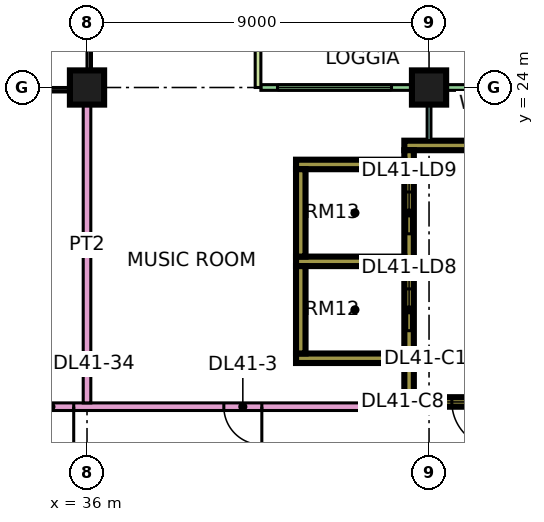
"""IFC4 building model, lengths in metres.
Left out: names, types, materials, properties, quantities, classifications, styles, units other than length and angle.
Written with IfcOpenShell. Run it as: python <this file> out.ifc"""

import sys

from ifc_helpers import new_model, si_unit, direction, frame, frame_2d, origin, origin_2d, place, context, subcontext, project, spatial, rectangle, extrude, element, fill, save


model = new_model("IFC4")
c1 = context("Model", 3, precision=1e-05, world=origin(), true_north=direction((0.0, 1.0)))
c2 = subcontext(c1, "Body", "Model", "MODEL_VIEW")
j1 = project(units=[si_unit("LENGTHUNIT", "METRE"), si_unit("PLANEANGLEUNIT", "RADIAN")], contexts=[c1])
p1 = place(None, origin())
s1 = spatial("IfcSite", under=j1, at=p1, CompositionType="ELEMENT")
p2 = place(p1, origin())
s2 = spatial("IfcBuilding", under=s1, at=p2, CompositionType="ELEMENT")
p3 = place(p2, frame((0.0, 0.0, 179.9)))
s3 = spatial("IfcBuildingStorey", under=s2, at=p3, CompositionType="ELEMENT", Elevation=179.9)
for number, where, z_axis, x_axis in (
    (1, (36.0, 24.0, 0.0), (0.0, 0.0, 1.0), (1.0, 0.0, 0.0)),
    (2, (45.0, 24.0, 0.0), (0.0, 0.0, 1.0), (1.0, 0.0, 0.0)),
):
    element("IfcColumn", number, at=place(p3, frame(where, z_axis=z_axis, x_axis=x_axis)), inside=s3, PredefinedType="COLUMN", context=c2, shape_type="SweptSolid", body=[
        extrude(rectangle(XDim=0.9, YDim=0.9, at=origin_2d()), origin(), (0.0, 0.0, 1.0), 3.75),
    ])
p4 = place(p3, frame((44.35, 15.725, 0.0), z_axis=(0.0, 0.0, 1.0), x_axis=(1.0, 0.0, 0.0)))
e3 = element("IfcWall", 3, at=p4, inside=s3, PredefinedType="SHEAR", context=c2, shape_type="SweptSolid", body=[
    extrude(rectangle(XDim=3.425, YDim=0.25, at=frame_2d((1.712, 0.0))), origin(), (0.0, 0.0, 1.0), 3.75),
])
p5 = place(p4, frame((1.25, 0.0, 0.0)))
e4 = element("IfcOpeningElement", 4, at=p5, cuts=e3, PredefinedType="OPENING", context=c2, shape_type="SweptSolid", body=[
    extrude(rectangle(XDim=1.2, YDim=2.2, at=frame_2d((0.6, 1.1))), frame((0.0, 0.135, 0.0), z_axis=(0.0, -1.0, 0.0), x_axis=(1.0, 0.0, 0.0)), (0.0, 0.0, 1.0), 0.27),
])
p6 = place(p3, frame((44.35, 22.475, 0.0), z_axis=(0.0, 0.0, 1.0), x_axis=(1.0, 0.0, 0.0)))
e5 = element("IfcWall", 5, at=p6, inside=s3, PredefinedType="SHEAR", context=c2, shape_type="SweptSolid", body=[
    extrude(rectangle(XDim=3.425, YDim=0.25, at=frame_2d((1.712, 0.0))), origin(), (0.0, 0.0, 1.0), 3.75),
])
p7 = place(p3, frame((44.475, 15.85, 0.0), z_axis=(0.0, 0.0, 1.0), x_axis=(0.0, 1.0, 0.0)))
e6 = element("IfcWall", 6, at=p7, inside=s3, PredefinedType="SHEAR", context=c2, shape_type="SweptSolid", body=[
    extrude(rectangle(XDim=6.5, YDim=0.25, at=frame_2d((3.25, 0.0))), origin(), (0.0, 0.0, 1.0), 3.75),
])
p8 = place(p7, frame((1.75, 0.0, 0.0)))
e7 = element("IfcOpeningElement", 7, at=p8, cuts=e6, PredefinedType="OPENING", context=c2, shape_type="SweptSolid", body=[
    extrude(rectangle(XDim=1.1, YDim=2.2, at=frame_2d((0.55, 1.1))), frame((0.0, 0.135, 0.0), z_axis=(0.0, -1.0, 0.0), x_axis=(1.0, 0.0, 0.0)), (0.0, 0.0, 1.0), 0.27),
])
p9 = place(p7, frame((4.3, 0.0, 0.0)))
e8 = element("IfcOpeningElement", 8, at=p9, cuts=e6, PredefinedType="OPENING", context=c2, shape_type="SweptSolid", body=[
    extrude(rectangle(XDim=1.1, YDim=2.2, at=frame_2d((0.55, 1.1))), frame((0.0, 0.135, 0.0), z_axis=(0.0, -1.0, 0.0), x_axis=(1.0, 0.0, 0.0)), (0.0, 0.0, 1.0), 0.27),
])
for number, where, z_axis, x_axis in (
    (9, (41.5, 16.875, 0.0), (0.0, 0.0, 1.0), (1.0, 0.0, 0.0)),
    (10, (41.5, 19.425, 0.0), (0.0, 0.0, 1.0), (1.0, 0.0, 0.0)),
    (11, (41.5, 21.975, 0.0), (0.0, 0.0, 1.0), (1.0, 0.0, 0.0)),
):
    element("IfcWall", number, at=place(p3, frame(where, z_axis=z_axis, x_axis=x_axis)), inside=s3, PredefinedType="SHEAR", context=c2, shape_type="SweptSolid", body=[
        extrude(rectangle(XDim=2.85, YDim=0.25, at=frame_2d((1.425, 0.0))), origin(), (0.0, 0.0, 1.0), 3.75),
    ])
for number, where, z_axis, x_axis in (
    (12, (41.625, 17.0, 0.0), (0.0, 0.0, 1.0), (0.0, 1.0, 0.0)),
    (13, (41.625, 19.55, 0.0), (0.0, 0.0, 1.0), (0.0, 1.0, 0.0)),
):
    element("IfcWall", number, at=place(p3, frame(where, z_axis=z_axis, x_axis=x_axis)), inside=s3, PredefinedType="SHEAR", context=c2, shape_type="SweptSolid", body=[
        extrude(rectangle(XDim=2.3, YDim=0.25, at=frame_2d((1.15, 0.0))), origin(), (0.0, 0.0, 1.0), 3.75),
    ])
p10 = place(p3, frame((47.925, 24.0, 0.0), z_axis=(0.0, 0.0, 1.0), x_axis=(-1.0, 0.0, 0.0)))
e14 = element("IfcWall", 14, at=p10, inside=s3, PredefinedType="SOLIDWALL", context=c2, shape_type="SweptSolid", body=[
    extrude(rectangle(XDim=7.35, YDim=0.15, at=frame_2d((3.675, 0.0))), origin(), (0.0, 0.0, 1.0), 3.35),
])
p11 = place(p10, frame((0.587, 0.0, 0.45)))
e15 = element("IfcOpeningElement", 15, at=p11, cuts=e14, PredefinedType="OPENING", context=c2, shape_type="SweptSolid", body=[
    extrude(rectangle(XDim=1.2, YDim=2.4, at=frame_2d((0.6, 1.2))), frame((0.0, 0.085, 0.0), z_axis=(0.0, -1.0, 0.0), x_axis=(1.0, 0.0, 0.0)), (0.0, 0.0, 1.0), 0.17),
])
p12 = place(p10, frame((3.913, 0.0, 0.45)))
e16 = element("IfcOpeningElement", 16, at=p12, cuts=e14, PredefinedType="OPENING", context=c2, shape_type="SweptSolid", body=[
    extrude(rectangle(XDim=3.0, YDim=2.4, at=frame_2d((1.5, 1.2))), frame((0.0, 0.085, 0.0), z_axis=(0.0, -1.0, 0.0), x_axis=(1.0, 0.0, 0.0)), (0.0, 0.0, 1.0), 0.17),
])
p13 = place(p3, frame((40.5, 25.5, 0.0), z_axis=(0.0, 0.0, 1.0), x_axis=(0.0, -1.0, 0.0)))
e17 = element("IfcWall", 17, at=p13, inside=s3, PredefinedType="SOLIDWALL", context=c2, shape_type="SweptSolid", body=[
    extrude(rectangle(XDim=1.5, YDim=0.15, at=frame_2d((0.75, 0.0))), origin(), (0.0, 0.0, 1.0), 3.35),
])
p14 = place(p3, frame((34.0, 15.6, 0.0), z_axis=(0.0, 0.0, 1.0), x_axis=(1.0, 0.0, 0.0)))
e18 = element("IfcWall", 18, at=p14, inside=s3, PredefinedType="PARTITIONING", context=c2, shape_type="SweptSolid", body=[
    extrude(rectangle(XDim=10.35, YDim=0.2, at=frame_2d((5.175, 0.0))), origin(), (0.0, 0.0, 1.0), 3.35),
])
p15 = place(p14, frame((5.6, 0.0, 0.0)))
e19 = element("IfcOpeningElement", 19, at=p15, cuts=e18, PredefinedType="OPENING", context=c2, shape_type="SweptSolid", body=[
    extrude(rectangle(XDim=1.0, YDim=2.1, at=frame_2d((0.5, 1.05))), frame((0.0, 0.11, 0.0), z_axis=(0.0, -1.0, 0.0), x_axis=(1.0, 0.0, 0.0)), (0.0, 0.0, 1.0), 0.22),
])
p16 = place(p14, frame((0.45, 0.0, 0.0)))
e20 = element("IfcOpeningElement", 20, at=p16, cuts=e18, PredefinedType="OPENING", context=c2, shape_type="SweptSolid", body=[
    extrude(rectangle(XDim=1.2, YDim=2.1, at=frame_2d((0.6, 1.05))), frame((0.0, 0.11, 0.0), z_axis=(0.0, -1.0, 0.0), x_axis=(1.0, 0.0, 0.0)), (0.0, 0.0, 1.0), 0.22),
])
p17 = place(p3, frame((36.0, 15.7, 0.0), z_axis=(0.0, 0.0, 1.0), x_axis=(0.0, 1.0, 0.0)))
e21 = element("IfcWall", 21, at=p17, inside=s3, PredefinedType="PARTITIONING", context=c2, shape_type="SweptSolid", body=[
    extrude(rectangle(XDim=8.3, YDim=0.2, at=frame_2d((4.15, 0.0))), origin(), (0.0, 0.0, 1.0), 3.35),
])
p18 = place(p3, frame((45.0, 22.6, 0.0), z_axis=(0.0, 0.0, 1.0), x_axis=(0.0, 1.0, 0.0)))
e22 = element("IfcWall", 22, at=p18, inside=s3, PredefinedType="PARTITIONING", context=c2, shape_type="SweptSolid", body=[
    extrude(rectangle(XDim=1.326, YDim=0.1, at=frame_2d((0.663, 0.0))), origin(), (0.0, 0.0, 1.0), 3.35),
])
p19 = place(p12, origin())
e23 = element("IfcWindow", 23, at=p19, inside=s3, PartitioningType="SINGLE_PANEL", PredefinedType="WINDOW", context=c2, shape_type="SweptSolid", body=[
    extrude(rectangle(XDim=3.0, YDim=2.4, at=frame_2d((1.5, 1.2))), frame((0.0, 0.03, 0.0), z_axis=(0.0, -1.0, 0.0), x_axis=(1.0, 0.0, 0.0)), (0.0, 0.0, 1.0), 0.06),
])
fill(e16, e23)
p20 = place(p5, origin())
e24 = element("IfcDoor", 24, at=p20, inside=s3, OperationType="SINGLE_SWING_RIGHT", PredefinedType="DOOR", context=c2, shape_type="SweptSolid", body=[
    extrude(rectangle(XDim=1.2, YDim=2.2, at=frame_2d((0.6, 1.1))), frame((0.0, 0.025, 0.0), z_axis=(0.0, -1.0, 0.0), x_axis=(1.0, 0.0, 0.0)), (0.0, 0.0, 1.0), 0.05),
])
fill(e4, e24)
p21 = place(p8, origin())
e25 = element("IfcDoor", 25, at=p21, inside=s3, OperationType="DOUBLE_DOOR_SLIDING", PredefinedType="DOOR", context=c2, shape_type="SweptSolid", body=[
    extrude(rectangle(XDim=1.1, YDim=2.2, at=frame_2d((0.55, 1.1))), frame((0.0, 0.025, 0.0), z_axis=(0.0, -1.0, 0.0), x_axis=(1.0, 0.0, 0.0)), (0.0, 0.0, 1.0), 0.05),
])
fill(e7, e25)
p22 = place(p9, origin())
e26 = element("IfcDoor", 26, at=p22, inside=s3, OperationType="DOUBLE_DOOR_SLIDING", PredefinedType="DOOR", context=c2, shape_type="SweptSolid", body=[
    extrude(rectangle(XDim=1.1, YDim=2.2, at=frame_2d((0.55, 1.1))), frame((0.0, 0.025, 0.0), z_axis=(0.0, -1.0, 0.0), x_axis=(1.0, 0.0, 0.0)), (0.0, 0.0, 1.0), 0.05),
])
fill(e8, e26)
p23 = place(p15, origin())
e27 = element("IfcDoor", 27, at=p23, inside=s3, OperationType="SINGLE_SWING_RIGHT", PredefinedType="DOOR", context=c2, shape_type="SweptSolid", body=[
    extrude(rectangle(XDim=1.0, YDim=2.1, at=frame_2d((0.5, 1.05))), frame((0.0, 0.025, 0.0), z_axis=(0.0, -1.0, 0.0), x_axis=(1.0, 0.0, 0.0)), (0.0, 0.0, 1.0), 0.05),
])
fill(e19, e27)
p24 = place(p16, origin())
e28 = element("IfcDoor", 28, at=p24, inside=s3, OperationType="SINGLE_SWING_RIGHT", PredefinedType="DOOR", context=c2, shape_type="SweptSolid", body=[
    extrude(rectangle(XDim=1.2, YDim=2.1, at=frame_2d((0.6, 1.05))), frame((0.0, 0.025, 0.0), z_axis=(0.0, -1.0, 0.0), x_axis=(1.0, 0.0, 0.0)), (0.0, 0.0, 1.0), 0.05),
])
fill(e20, e28)
save(model, sys.argv[1])
